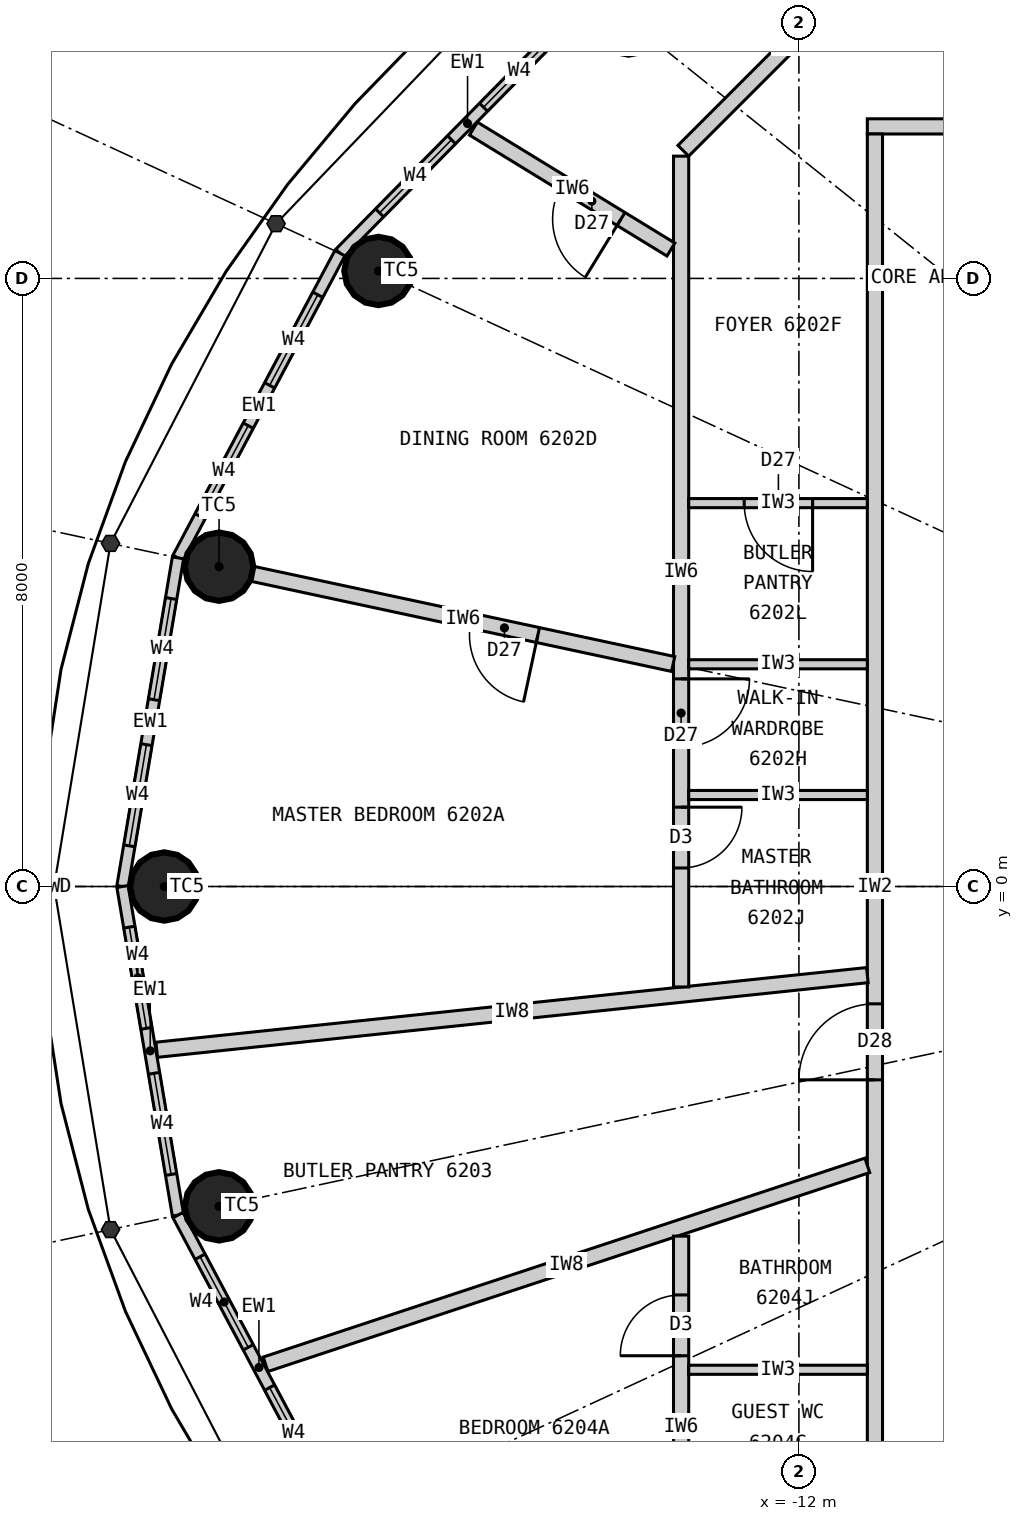
"""IFC4 building model, lengths in metres.
Left out: names, types, materials, properties, quantities, classifications, styles, units other than length and angle.
Written with IfcOpenShell. Run it as: python <this file> out.ifc"""

import sys

from ifc_helpers import new_model, si_unit, direction, frame, frame_2d, origin, origin_2d, place, context, subcontext, project, spatial, rectangle, circle, extrude, clip, halfspace, element, fill, save


model = new_model("IFC4")
c1 = context("Model", 3, precision=1e-05, world=origin(), true_north=direction((0.0, 1.0)))
c2 = subcontext(c1, "Body", "Model", "MODEL_VIEW")
j1 = project(units=[si_unit("LENGTHUNIT", "METRE"), si_unit("PLANEANGLEUNIT", "RADIAN")], contexts=[c1])
p1 = place(None, origin())
s1 = spatial("IfcSite", under=j1, at=p1, CompositionType="ELEMENT")
p2 = place(p1, origin())
s2 = spatial("IfcBuilding", under=s1, at=p2, CompositionType="ELEMENT")
p3 = place(p2, frame((0.0, 0.0, 229.2)))
s3 = spatial("IfcBuildingStorey", under=s2, at=p3, CompositionType="ELEMENT", Elevation=229.2)
for number, where, z_axis, x_axis in (
    (1, (-14.241, 11.393, 0.0), (0.0, 0.0, 1.0), (1.0, 0.0, 0.0)),
    (2, (-17.532, 8.098, 0.0), (0.0, 0.0, 1.0), (1.0, 0.0, 0.0)),
    (3, (-19.629, 4.208, 0.0), (0.0, 0.0, 1.0), (1.0, 0.0, 0.0)),
    (4, (-20.35, 0.0, 0.0), (0.0, 0.0, 1.0), (1.0, 0.0, 0.0)),
    (5, (-19.629, -4.208, 0.0), (0.0, 0.0, 1.0), (1.0, 0.0, 0.0)),
):
    element("IfcColumn", number, at=place(p3, frame(where, z_axis=z_axis, x_axis=x_axis)), inside=s3, PredefinedType="COLUMN", context=c2, shape_type="Clipping", body=[
        clip(extrude(circle(Radius=0.45, at=origin_2d()), origin(), (0.0, 0.0, 1.0), 3.3), halfspace(frame((0.0, 0.0, 2.25), z_axis=(0.0, 0.0, 1.0), x_axis=(1.0, 0.0, 0.0)), False)),
    ])
p4 = place(p3, frame((-14.68, 11.744, 0.0), z_axis=(0.0, 0.0, 1.0), x_axis=(-0.701527379618, -0.712642501993, 0.0)))
e6 = element("IfcWall", 6, at=p4, inside=s3, PredefinedType="ELEMENTEDWALL", context=c2, shape_type="SweptSolid", body=[
    extrude(rectangle(XDim=4.788, YDim=0.15, at=frame_2d((2.394, 0.0))), origin(), (0.0, 0.0, 1.0), 3.05),
])
p5 = place(p4, frame((0.744, 0.0, 0.9)))
e7 = element("IfcOpeningElement", 7, at=p5, cuts=e6, PredefinedType="OPENING", context=c2, shape_type="SweptSolid", body=[
    extrude(rectangle(XDim=1.35, YDim=1.9, at=frame_2d((0.675, 0.95))), frame((0.0, 0.085, 0.0), z_axis=(0.0, -1.0, 0.0), x_axis=(1.0, 0.0, 0.0)), (0.0, 0.0, 1.0), 0.17),
])
p6 = place(p4, frame((2.694, 0.0, 0.9)))
e8 = element("IfcOpeningElement", 8, at=p6, cuts=e6, PredefinedType="OPENING", context=c2, shape_type="SweptSolid", body=[
    extrude(rectangle(XDim=1.35, YDim=1.9, at=frame_2d((0.675, 0.95))), frame((0.0, 0.085, 0.0), z_axis=(0.0, -1.0, 0.0), x_axis=(1.0, 0.0, 0.0)), (0.0, 0.0, 1.0), 0.17),
])
p7 = place(p3, frame((-18.04, 8.332, 0.0), z_axis=(0.0, 0.0, 1.0), x_axis=(-0.469256152955, -0.883062094597, 0.0)))
e9 = element("IfcWall", 9, at=p7, inside=s3, PredefinedType="ELEMENTEDWALL", context=c2, shape_type="SweptSolid", body=[
    extrude(rectangle(XDim=4.539, YDim=0.15, at=frame_2d((2.27, 0.0))), origin(), (0.0, 0.0, 1.0), 3.05),
])
p8 = place(p7, frame((0.62, 0.0, 0.9)))
e10 = element("IfcOpeningElement", 10, at=p8, cuts=e9, PredefinedType="OPENING", context=c2, shape_type="SweptSolid", body=[
    extrude(rectangle(XDim=1.35, YDim=1.9, at=frame_2d((0.675, 0.95))), frame((0.0, 0.085, 0.0), z_axis=(0.0, -1.0, 0.0), x_axis=(1.0, 0.0, 0.0)), (0.0, 0.0, 1.0), 0.17),
])
p9 = place(p7, frame((2.57, 0.0, 0.9)))
e11 = element("IfcOpeningElement", 11, at=p9, cuts=e9, PredefinedType="OPENING", context=c2, shape_type="SweptSolid", body=[
    extrude(rectangle(XDim=1.35, YDim=1.9, at=frame_2d((0.675, 0.95))), frame((0.0, 0.085, 0.0), z_axis=(0.0, -1.0, 0.0), x_axis=(1.0, 0.0, 0.0)), (0.0, 0.0, 1.0), 0.17),
])
p10 = place(p3, frame((-20.17, 4.323, 0.0), z_axis=(0.0, 0.0, 1.0), x_axis=(-0.166538513568, -0.986034950445, 0.0)))
e12 = element("IfcWall", 12, at=p10, inside=s3, PredefinedType="ELEMENTEDWALL", context=c2, shape_type="SweptSolid", body=[
    extrude(rectangle(XDim=4.385, YDim=0.15, at=frame_2d((2.192, 0.0))), origin(), (0.0, 0.0, 1.0), 3.05),
])
p11 = place(p10, frame((0.542, 0.0, 0.9)))
e13 = element("IfcOpeningElement", 13, at=p11, cuts=e12, PredefinedType="OPENING", context=c2, shape_type="SweptSolid", body=[
    extrude(rectangle(XDim=1.35, YDim=1.9, at=frame_2d((0.675, 0.95))), frame((0.0, 0.085, 0.0), z_axis=(0.0, -1.0, 0.0), x_axis=(1.0, 0.0, 0.0)), (0.0, 0.0, 1.0), 0.17),
])
p12 = place(p10, frame((2.492, 0.0, 0.9)))
e14 = element("IfcOpeningElement", 14, at=p12, cuts=e12, PredefinedType="OPENING", context=c2, shape_type="SweptSolid", body=[
    extrude(rectangle(XDim=1.35, YDim=1.9, at=frame_2d((0.675, 0.95))), frame((0.0, 0.085, 0.0), z_axis=(0.0, -1.0, 0.0), x_axis=(1.0, 0.0, 0.0)), (0.0, 0.0, 1.0), 0.17),
])
p13 = place(p3, frame((-20.9, 0.0, 0.0), z_axis=(0.0, 0.0, 1.0), x_axis=(0.166538513568, -0.986034950445, 0.0)))
e15 = element("IfcWall", 15, at=p13, inside=s3, PredefinedType="ELEMENTEDWALL", context=c2, shape_type="SweptSolid", body=[
    extrude(rectangle(XDim=4.385, YDim=0.15, at=frame_2d((2.192, 0.0))), origin(), (0.0, 0.0, 1.0), 3.05),
])
p14 = place(p13, frame((0.542, 0.0, 0.9)))
e16 = element("IfcOpeningElement", 16, at=p14, cuts=e15, PredefinedType="OPENING", context=c2, shape_type="SweptSolid", body=[
    extrude(rectangle(XDim=1.35, YDim=1.9, at=frame_2d((0.675, 0.95))), frame((0.0, 0.085, 0.0), z_axis=(0.0, -1.0, 0.0), x_axis=(1.0, 0.0, 0.0)), (0.0, 0.0, 1.0), 0.17),
])
p15 = place(p13, frame((2.492, 0.0, 0.9)))
e17 = element("IfcOpeningElement", 17, at=p15, cuts=e15, PredefinedType="OPENING", context=c2, shape_type="SweptSolid", body=[
    extrude(rectangle(XDim=1.35, YDim=1.9, at=frame_2d((0.675, 0.95))), frame((0.0, 0.085, 0.0), z_axis=(0.0, -1.0, 0.0), x_axis=(1.0, 0.0, 0.0)), (0.0, 0.0, 1.0), 0.17),
])
p16 = place(p3, frame((-20.17, -4.323, 0.0), z_axis=(0.0, 0.0, 1.0), x_axis=(0.469256152955, -0.883062094597, 0.0)))
e18 = element("IfcWall", 18, at=p16, inside=s3, PredefinedType="ELEMENTEDWALL", context=c2, shape_type="SweptSolid", body=[
    extrude(rectangle(XDim=4.539, YDim=0.15, at=frame_2d((2.27, 0.0))), origin(), (0.0, 0.0, 1.0), 3.05),
])
p17 = place(p16, frame((0.62, 0.0, 0.9)))
e19 = element("IfcOpeningElement", 19, at=p17, cuts=e18, PredefinedType="OPENING", context=c2, shape_type="SweptSolid", body=[
    extrude(rectangle(XDim=1.35, YDim=1.9, at=frame_2d((0.675, 0.95))), frame((0.0, 0.085, 0.0), z_axis=(0.0, -1.0, 0.0), x_axis=(1.0, 0.0, 0.0)), (0.0, 0.0, 1.0), 0.17),
])
p18 = place(p16, frame((2.57, 0.0, 0.9)))
e20 = element("IfcOpeningElement", 20, at=p18, cuts=e18, PredefinedType="OPENING", context=c2, shape_type="SweptSolid", body=[
    extrude(rectangle(XDim=1.35, YDim=1.9, at=frame_2d((0.675, 0.95))), frame((0.0, 0.085, 0.0), z_axis=(0.0, -1.0, 0.0), x_axis=(1.0, 0.0, 0.0)), (0.0, 0.0, 1.0), 0.17),
])
p19 = place(p3, frame((-11.1, 10.0, 0.0), z_axis=(0.0, 0.0, 1.0), x_axis=(1.0, 0.0, 0.0)))
e21 = element("IfcWall", 21, at=p19, inside=s3, PredefinedType="PARTITIONING", context=c2, shape_type="SweptSolid", body=[
    extrude(rectangle(XDim=22.2, YDim=0.2, at=frame_2d((11.1, 0.0))), origin(), (0.0, 0.0, 1.0), 3.05),
])
p20 = place(p19, frame((2.29, 0.0, 0.0)))
e22 = element("IfcOpeningElement", 22, at=p20, cuts=e21, PredefinedType="OPENING", context=c2, shape_type="SweptSolid", body=[
    extrude(rectangle(XDim=1.0, YDim=2.2, at=frame_2d((0.5, 1.1))), frame((0.0, 0.11, 0.0), z_axis=(0.0, -1.0, 0.0), x_axis=(1.0, 0.0, 0.0)), (0.0, 0.0, 1.0), 0.22),
])
p21 = place(p3, frame((-11.0, 9.9, 0.0), z_axis=(0.0, 0.0, 1.0), x_axis=(0.0, -1.0, 0.0)))
e23 = element("IfcWall", 23, at=p21, inside=s3, PredefinedType="PARTITIONING", context=c2, shape_type="SweptSolid", body=[
    extrude(rectangle(XDim=19.8, YDim=0.2, at=frame_2d((9.9, 0.0))), origin(), (0.0, 0.0, 1.0), 3.05),
])
p22 = place(p21, frame((11.444, 0.0, 0.0)))
e24 = element("IfcOpeningElement", 24, at=p22, cuts=e23, PredefinedType="OPENING", context=c2, shape_type="SweptSolid", body=[
    extrude(rectangle(XDim=1.0, YDim=2.2, at=frame_2d((0.5, 1.1))), frame((0.0, 0.11, 0.0), z_axis=(0.0, -1.0, 0.0), x_axis=(1.0, 0.0, 0.0)), (0.0, 0.0, 1.0), 0.22),
])
p23 = place(p3, frame((-11.1, -1.166, 0.0), z_axis=(0.0, 0.0, 1.0), x_axis=(-0.994527487125, -0.104475247564, 0.0)))
e25 = element("IfcWall", 25, at=p23, inside=s3, PredefinedType="PARTITIONING", context=c2, shape_type="SweptSolid", body=[
    extrude(rectangle(XDim=9.401, YDim=0.2, at=frame_2d((4.701, 0.0))), origin(), (0.0, 0.0, 1.0), 2.3),
])
p24 = place(p3, frame((-11.1, -3.669, 0.0), z_axis=(0.0, 0.0, 1.0), x_axis=(-0.949476668397, -0.313837627079, 0.0)))
e26 = element("IfcWall", 26, at=p24, inside=s3, PredefinedType="PARTITIONING", context=c2, shape_type="SweptSolid", body=[
    extrude(rectangle(XDim=8.339, YDim=0.2, at=frame_2d((4.169, 0.0))), origin(), (0.0, 0.0, 1.0), 3.05),
])
p25 = place(p3, frame((-10.679, 12.521, 0.0), z_axis=(0.0, 0.0, 1.0), x_axis=(-0.707106781187, -0.707106781187, 0.0)))
e27 = element("IfcWall", 27, at=p25, inside=s3, PredefinedType="PARTITIONING", context=c2, shape_type="SweptSolid", body=[
    extrude(rectangle(XDim=4.019, YDim=0.2, at=frame_2d((2.009, 0.0))), origin(), (0.0, 0.0, 1.0), 3.05),
])
p26 = place(p3, frame((-13.55, 9.609, 0.0), z_axis=(0.0, 0.0, 1.0), x_axis=(0.0, -1.0, 0.0)))
e28 = element("IfcWall", 28, at=p26, inside=s3, PredefinedType="PARTITIONING", context=c2, shape_type="SweptSolid", body=[
    extrude(rectangle(XDim=10.93, YDim=0.2, at=frame_2d((5.465, 0.0))), origin(), (0.0, 0.0, 1.0), 3.05),
])
p27 = place(p26, frame((6.877, 0.0, 0.0)))
e29 = element("IfcOpeningElement", 29, at=p27, cuts=e28, PredefinedType="OPENING", context=c2, shape_type="SweptSolid", body=[
    extrude(rectangle(XDim=0.9, YDim=2.1, at=frame_2d((0.45, 1.05))), frame((0.0, 0.11, 0.0), z_axis=(0.0, -1.0, 0.0), x_axis=(1.0, 0.0, 0.0)), (0.0, 0.0, 1.0), 0.22),
])
p28 = place(p26, frame((8.565, 0.0, 0.0)))
e30 = element("IfcOpeningElement", 30, at=p28, cuts=e28, PredefinedType="OPENING", context=c2, shape_type="SweptSolid", body=[
    extrude(rectangle(XDim=0.8, YDim=2.1, at=frame_2d((0.4, 1.05))), frame((0.0, 0.11, 0.0), z_axis=(0.0, -1.0, 0.0), x_axis=(1.0, 0.0, 0.0)), (0.0, 0.0, 1.0), 0.22),
])
p29 = place(p3, frame((-13.684, 8.38, 0.0), z_axis=(0.0, 0.0, 1.0), x_axis=(-0.852784302627, 0.522263279576, 0.0)))
e31 = element("IfcWall", 31, at=p29, inside=s3, PredefinedType="PARTITIONING", context=c2, shape_type="SweptSolid", body=[
    extrude(rectangle(XDim=3.047, YDim=0.2, at=frame_2d((1.523, 0.0))), origin(), (0.0, 0.0, 1.0), 3.05),
])
p30 = place(p29, frame((0.77, 0.0, 0.0)))
e32 = element("IfcOpeningElement", 32, at=p30, cuts=e31, PredefinedType="OPENING", context=c2, shape_type="SweptSolid", body=[
    extrude(rectangle(XDim=0.9, YDim=2.1, at=frame_2d((0.45, 1.05))), frame((0.0, 0.11, 0.0), z_axis=(0.0, -1.0, 0.0), x_axis=(1.0, 0.0, 0.0)), (0.0, 0.0, 1.0), 0.22),
])
p31 = place(p3, frame((-13.655, 2.927, 0.0), z_axis=(0.0, 0.0, 1.0), x_axis=(-0.977790419294, 0.209585056568, 0.0)))
e33 = element("IfcWall", 33, at=p31, inside=s3, PredefinedType="PARTITIONING", context=c2, shape_type="SweptSolid", body=[
    extrude(rectangle(XDim=5.66, YDim=0.2, at=frame_2d((2.83, 0.0))), origin(), (0.0, 0.0, 1.0), 2.15),
])
p32 = place(p31, frame((1.82, 0.0, 0.0)))
e34 = element("IfcOpeningElement", 34, at=p32, cuts=e33, PredefinedType="OPENING", context=c2, shape_type="SweptSolid", body=[
    extrude(rectangle(XDim=0.9, YDim=2.1, at=frame_2d((0.45, 1.05))), frame((0.0, 0.11, 0.0), z_axis=(0.0, -1.0, 0.0), x_axis=(1.0, 0.0, 0.0)), (0.0, 0.0, 1.0), 0.22),
])
p33 = place(p3, frame((-11.1, 5.044, 0.0), z_axis=(0.0, 0.0, 1.0), x_axis=(-1.0, 0.0, 0.0)))
e35 = element("IfcWall", 35, at=p33, inside=s3, PredefinedType="PARTITIONING", context=c2, shape_type="SweptSolid", body=[
    extrude(rectangle(XDim=2.35, YDim=0.12, at=frame_2d((1.175, 0.0))), origin(), (0.0, 0.0, 1.0), 3.05),
])
p34 = place(p33, frame((0.72, 0.0, 0.0)))
e36 = element("IfcOpeningElement", 36, at=p34, cuts=e35, PredefinedType="OPENING", context=c2, shape_type="SweptSolid", body=[
    extrude(rectangle(XDim=0.9, YDim=2.1, at=frame_2d((0.45, 1.05))), frame((0.0, 0.07, 0.0), z_axis=(0.0, -1.0, 0.0), x_axis=(1.0, 0.0, 0.0)), (0.0, 0.0, 1.0), 0.14),
])
p35 = place(p3, frame((-11.1, 2.924, 0.0), z_axis=(0.0, 0.0, 1.0), x_axis=(-1.0, 0.0, 0.0)))
e37 = element("IfcWall", 37, at=p35, inside=s3, PredefinedType="PARTITIONING", context=c2, shape_type="SweptSolid", body=[
    extrude(rectangle(XDim=2.35, YDim=0.12, at=frame_2d((1.175, 0.0))), origin(), (0.0, 0.0, 1.0), 2.15),
])
p36 = place(p3, frame((-11.1, 1.204, 0.0), z_axis=(0.0, 0.0, 1.0), x_axis=(-1.0, 0.0, 0.0)))
e38 = element("IfcWall", 38, at=p36, inside=s3, PredefinedType="PARTITIONING", context=c2, shape_type="SweptSolid", body=[
    extrude(rectangle(XDim=2.35, YDim=0.12, at=frame_2d((1.175, 0.0))), origin(), (0.0, 0.0, 1.0), 3.05),
])
p37 = place(p3, frame((-13.55, -4.6, 0.0), z_axis=(0.0, 0.0, 1.0), x_axis=(0.0, -1.0, 0.0)))
e39 = element("IfcWall", 39, at=p37, inside=s3, PredefinedType="PARTITIONING", context=c2, shape_type="SweptSolid", body=[
    extrude(rectangle(XDim=5.009, YDim=0.2, at=frame_2d((2.504, 0.0))), origin(), (0.0, 0.0, 1.0), 3.05),
])
p38 = place(p37, frame((0.774, 0.0, 0.0)))
e40 = element("IfcOpeningElement", 40, at=p38, cuts=e39, PredefinedType="OPENING", context=c2, shape_type="SweptSolid", body=[
    extrude(rectangle(XDim=0.8, YDim=2.1, at=frame_2d((0.4, 1.05))), frame((0.0, 0.11, 0.0), z_axis=(0.0, -1.0, 0.0), x_axis=(1.0, 0.0, 0.0)), (0.0, 0.0, 1.0), 0.22),
])
p39 = place(p3, frame((-11.1, -6.358, 0.0), z_axis=(0.0, 0.0, 1.0), x_axis=(-1.0, 0.0, 0.0)))
e41 = element("IfcWall", 41, at=p39, inside=s3, PredefinedType="PARTITIONING", context=c2, shape_type="SweptSolid", body=[
    extrude(rectangle(XDim=2.35, YDim=0.12, at=frame_2d((1.175, 0.0))), origin(), (0.0, 0.0, 1.0), 3.05),
])
p40 = place(p5, origin())
e42 = element("IfcWindow", 42, at=p40, inside=s3, PartitioningType="SINGLE_PANEL", PredefinedType="WINDOW", context=c2, shape_type="SweptSolid", body=[
    extrude(rectangle(XDim=1.35, YDim=1.9, at=frame_2d((0.675, 0.95))), frame((0.0, 0.03, 0.0), z_axis=(0.0, -1.0, 0.0), x_axis=(1.0, 0.0, 0.0)), (0.0, 0.0, 1.0), 0.06),
])
fill(e7, e42)
p41 = place(p6, origin())
e43 = element("IfcWindow", 43, at=p41, inside=s3, PartitioningType="SINGLE_PANEL", PredefinedType="WINDOW", context=c2, shape_type="SweptSolid", body=[
    extrude(rectangle(XDim=1.35, YDim=1.9, at=frame_2d((0.675, 0.95))), frame((0.0, 0.03, 0.0), z_axis=(0.0, -1.0, 0.0), x_axis=(1.0, 0.0, 0.0)), (0.0, 0.0, 1.0), 0.06),
])
fill(e8, e43)
p42 = place(p8, origin())
e44 = element("IfcWindow", 44, at=p42, inside=s3, PartitioningType="SINGLE_PANEL", PredefinedType="WINDOW", context=c2, shape_type="SweptSolid", body=[
    extrude(rectangle(XDim=1.35, YDim=1.9, at=frame_2d((0.675, 0.95))), frame((0.0, 0.03, 0.0), z_axis=(0.0, -1.0, 0.0), x_axis=(1.0, 0.0, 0.0)), (0.0, 0.0, 1.0), 0.06),
])
fill(e10, e44)
p43 = place(p9, origin())
e45 = element("IfcWindow", 45, at=p43, inside=s3, PartitioningType="SINGLE_PANEL", PredefinedType="WINDOW", context=c2, shape_type="SweptSolid", body=[
    extrude(rectangle(XDim=1.35, YDim=1.9, at=frame_2d((0.675, 0.95))), frame((0.0, 0.03, 0.0), z_axis=(0.0, -1.0, 0.0), x_axis=(1.0, 0.0, 0.0)), (0.0, 0.0, 1.0), 0.06),
])
fill(e11, e45)
p44 = place(p11, origin())
e46 = element("IfcWindow", 46, at=p44, inside=s3, PartitioningType="SINGLE_PANEL", PredefinedType="WINDOW", context=c2, shape_type="SweptSolid", body=[
    extrude(rectangle(XDim=1.35, YDim=1.9, at=frame_2d((0.675, 0.95))), frame((0.0, 0.03, 0.0), z_axis=(0.0, -1.0, 0.0), x_axis=(1.0, 0.0, 0.0)), (0.0, 0.0, 1.0), 0.06),
])
fill(e13, e46)
p45 = place(p12, origin())
e47 = element("IfcWindow", 47, at=p45, inside=s3, PartitioningType="SINGLE_PANEL", PredefinedType="WINDOW", context=c2, shape_type="SweptSolid", body=[
    extrude(rectangle(XDim=1.35, YDim=1.9, at=frame_2d((0.675, 0.95))), frame((0.0, 0.03, 0.0), z_axis=(0.0, -1.0, 0.0), x_axis=(1.0, 0.0, 0.0)), (0.0, 0.0, 1.0), 0.06),
])
fill(e14, e47)
p46 = place(p14, origin())
e48 = element("IfcWindow", 48, at=p46, inside=s3, PartitioningType="SINGLE_PANEL", PredefinedType="WINDOW", context=c2, shape_type="SweptSolid", body=[
    extrude(rectangle(XDim=1.35, YDim=1.9, at=frame_2d((0.675, 0.95))), frame((0.0, 0.03, 0.0), z_axis=(0.0, -1.0, 0.0), x_axis=(1.0, 0.0, 0.0)), (0.0, 0.0, 1.0), 0.06),
])
fill(e16, e48)
p47 = place(p15, origin())
e49 = element("IfcWindow", 49, at=p47, inside=s3, PartitioningType="SINGLE_PANEL", PredefinedType="WINDOW", context=c2, shape_type="SweptSolid", body=[
    extrude(rectangle(XDim=1.35, YDim=1.9, at=frame_2d((0.675, 0.95))), frame((0.0, 0.03, 0.0), z_axis=(0.0, -1.0, 0.0), x_axis=(1.0, 0.0, 0.0)), (0.0, 0.0, 1.0), 0.06),
])
fill(e17, e49)
p48 = place(p17, origin())
e50 = element("IfcWindow", 50, at=p48, inside=s3, PartitioningType="SINGLE_PANEL", PredefinedType="WINDOW", context=c2, shape_type="SweptSolid", body=[
    extrude(rectangle(XDim=1.35, YDim=1.9, at=frame_2d((0.675, 0.95))), frame((0.0, 0.03, 0.0), z_axis=(0.0, -1.0, 0.0), x_axis=(1.0, 0.0, 0.0)), (0.0, 0.0, 1.0), 0.06),
])
fill(e19, e50)
p49 = place(p18, origin())
e51 = element("IfcWindow", 51, at=p49, inside=s3, PartitioningType="SINGLE_PANEL", PredefinedType="WINDOW", context=c2, shape_type="SweptSolid", body=[
    extrude(rectangle(XDim=1.35, YDim=1.9, at=frame_2d((0.675, 0.95))), frame((0.0, 0.03, 0.0), z_axis=(0.0, -1.0, 0.0), x_axis=(1.0, 0.0, 0.0)), (0.0, 0.0, 1.0), 0.06),
])
fill(e20, e51)
p50 = place(p34, origin())
e52 = element("IfcDoor", 52, at=p50, inside=s3, OperationType="SINGLE_SWING_LEFT", PredefinedType="DOOR", context=c2, shape_type="SweptSolid", body=[
    extrude(rectangle(XDim=0.9, YDim=2.1, at=frame_2d((0.45, 1.05))), frame((0.0, 0.025, 0.0), z_axis=(0.0, -1.0, 0.0), x_axis=(1.0, 0.0, 0.0)), (0.0, 0.0, 1.0), 0.05),
])
fill(e36, e52)
p51 = place(p27, origin())
e53 = element("IfcDoor", 53, at=p51, inside=s3, OperationType="SINGLE_SWING_LEFT", PredefinedType="DOOR", context=c2, shape_type="SweptSolid", body=[
    extrude(rectangle(XDim=0.9, YDim=2.1, at=frame_2d((0.45, 1.05))), frame((0.0, 0.025, 0.0), z_axis=(0.0, -1.0, 0.0), x_axis=(1.0, 0.0, 0.0)), (0.0, 0.0, 1.0), 0.05),
])
fill(e29, e53)
p52 = place(p28, origin())
e54 = element("IfcDoor", 54, at=p52, inside=s3, OperationType="SINGLE_SWING_LEFT", PredefinedType="DOOR", context=c2, shape_type="SweptSolid", body=[
    extrude(rectangle(XDim=0.8, YDim=2.1, at=frame_2d((0.4, 1.05))), frame((0.0, 0.025, 0.0), z_axis=(0.0, -1.0, 0.0), x_axis=(1.0, 0.0, 0.0)), (0.0, 0.0, 1.0), 0.05),
])
fill(e30, e54)
p53 = place(p30, origin())
e55 = element("IfcDoor", 55, at=p53, inside=s3, OperationType="SINGLE_SWING_LEFT", PredefinedType="DOOR", context=c2, shape_type="SweptSolid", body=[
    extrude(rectangle(XDim=0.9, YDim=2.1, at=frame_2d((0.45, 1.05))), frame((0.0, 0.025, 0.0), z_axis=(0.0, -1.0, 0.0), x_axis=(1.0, 0.0, 0.0)), (0.0, 0.0, 1.0), 0.05),
])
fill(e32, e55)
p54 = place(p32, origin())
e56 = element("IfcDoor", 56, at=p54, inside=s3, OperationType="SINGLE_SWING_LEFT", PredefinedType="DOOR", context=c2, shape_type="SweptSolid", body=[
    extrude(rectangle(XDim=0.9, YDim=2.1, at=frame_2d((0.45, 1.05))), frame((0.0, 0.025, 0.0), z_axis=(0.0, -1.0, 0.0), x_axis=(1.0, 0.0, 0.0)), (0.0, 0.0, 1.0), 0.05),
])
fill(e34, e56)
p55 = place(p22, origin())
e57 = element("IfcDoor", 57, at=p55, inside=s3, OperationType="SINGLE_SWING_RIGHT", PredefinedType="DOOR", context=c2, shape_type="SweptSolid", body=[
    extrude(rectangle(XDim=1.0, YDim=2.2, at=frame_2d((0.5, 1.1))), frame((0.0, 0.025, 0.0), z_axis=(0.0, -1.0, 0.0), x_axis=(1.0, 0.0, 0.0)), (0.0, 0.0, 1.0), 0.05),
])
fill(e24, e57)
p56 = place(p38, origin())
e58 = element("IfcDoor", 58, at=p56, inside=s3, OperationType="SINGLE_SWING_RIGHT", PredefinedType="DOOR", context=c2, shape_type="SweptSolid", body=[
    extrude(rectangle(XDim=0.8, YDim=2.1, at=frame_2d((0.4, 1.05))), frame((0.0, 0.025, 0.0), z_axis=(0.0, -1.0, 0.0), x_axis=(1.0, 0.0, 0.0)), (0.0, 0.0, 1.0), 0.05),
])
fill(e40, e58)
save(model, sys.argv[1])
